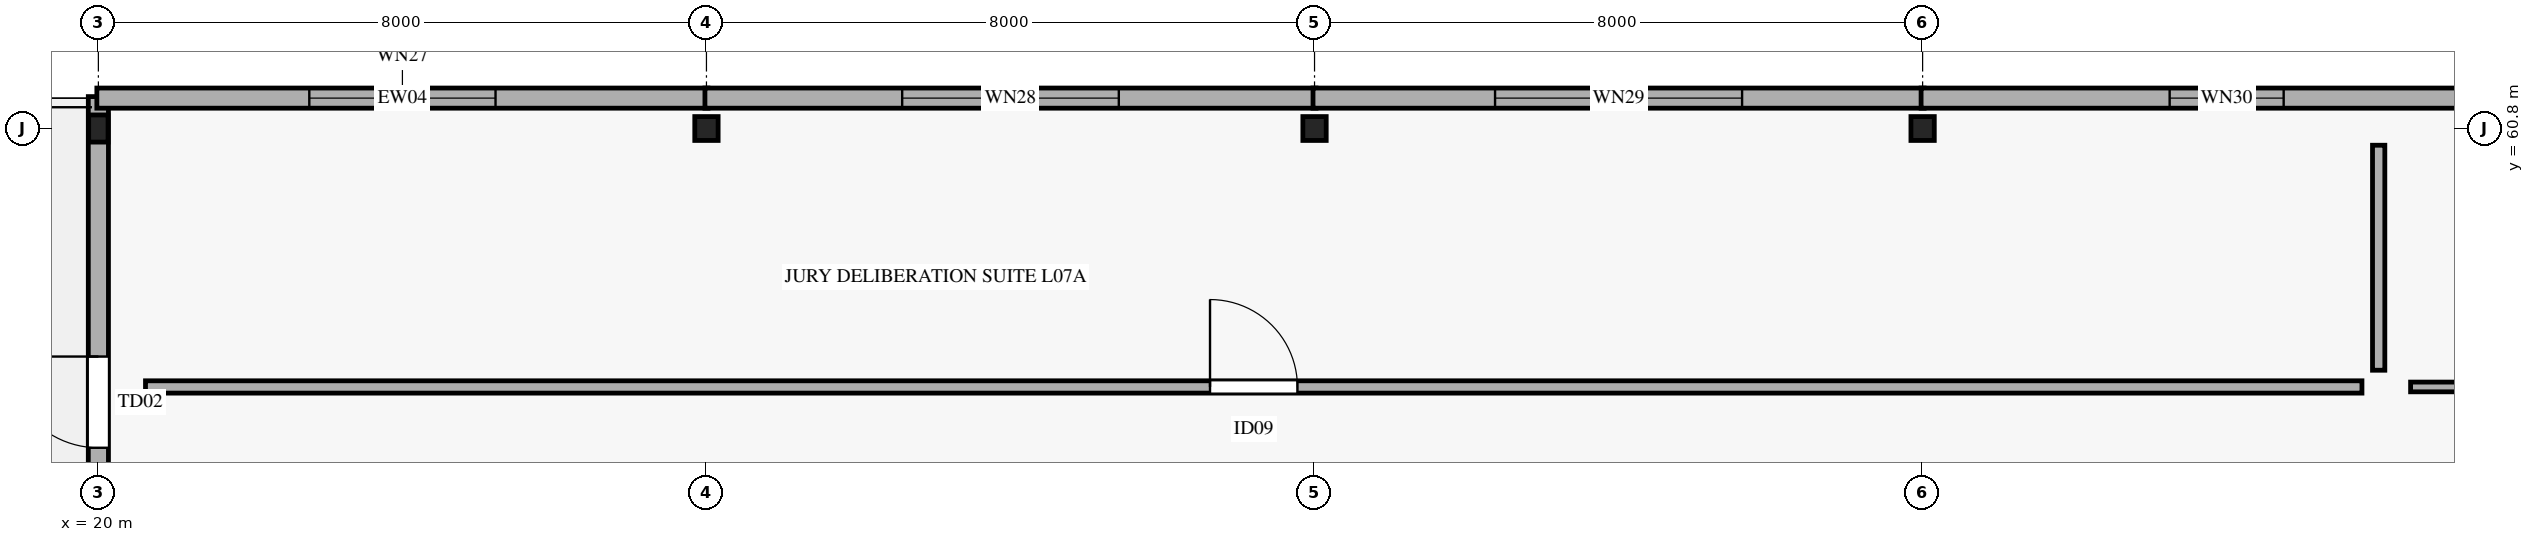
"""IFC4 building model, lengths in metres.
Left out: names, types, materials, properties, quantities, classifications, styles, units other than length and angle.
Written with IfcOpenShell. Run it as: python <this file> out.ifc"""

import sys

from ifc_helpers import new_model, si_unit, direction, frame, frame_2d, origin, origin_2d, place, context, subcontext, project, spatial, rectangle, i_section, extrude, element, fill, save


model = new_model("IFC4")
c1 = context("Model", 3, precision=1e-05, world=origin(), true_north=direction((0.0, 1.0)))
c2 = subcontext(c1, "Body", "Model", "MODEL_VIEW")
j1 = project(units=[si_unit("LENGTHUNIT", "METRE"), si_unit("PLANEANGLEUNIT", "RADIAN")], contexts=[c1])
p1 = place(None, origin())
s1 = spatial("IfcSite", under=j1, at=p1, CompositionType="ELEMENT")
p2 = place(p1, origin())
s2 = spatial("IfcBuilding", under=s1, at=p2, CompositionType="ELEMENT")
p3 = place(p2, frame((0.0, 0.0, 33.6)))
s3 = spatial("IfcBuildingStorey", under=s2, at=p3, CompositionType="ELEMENT", Elevation=33.6)
p4 = place(p3, frame((20.0, 60.8, 0.0), z_axis=(0.0, 0.0, 1.0), x_axis=(1.0, 0.0, 0.0)))
e1 = element("IfcColumn", 1, at=p4, inside=s3, PredefinedType="COLUMN", context=c2, shape_type="SweptSolid", body=[
    extrude(i_section(OverallWidth=0.255, OverallDepth=0.357, WebThickness=0.01, FlangeThickness=0.018, FilletRadius=0.015, at=origin_2d()), origin(), (0.0, 0.0, 1.0), 3.995),
])
for number, where, z_axis, x_axis in (
    (2, (28.0, 60.8, 0.0), (0.0, 0.0, 1.0), (1.0, 0.0, 0.0)),
    (3, (36.0, 60.8, 0.0), (0.0, 0.0, 1.0), (1.0, 0.0, 0.0)),
    (4, (44.0, 60.8, 0.0), (0.0, 0.0, 1.0), (1.0, 0.0, 0.0)),
):
    element("IfcColumn", number, at=place(p3, frame(where, z_axis=z_axis, x_axis=x_axis)), inside=s3, PredefinedType="COLUMN", context=c2, shape_type="SweptSolid", body=[
        extrude(i_section(OverallWidth=0.307, OverallDepth=0.314, WebThickness=0.012, FlangeThickness=0.019, FilletRadius=0.015, at=origin_2d()), origin(), (0.0, 0.0, 1.0), 3.995),
    ])
p5 = place(p3, frame((20.0, 53.18, 0.0), z_axis=(0.0, 0.0, 1.0), x_axis=(0.0, 1.0, 0.0)))
e5 = element("IfcWall", 5, at=p5, inside=s3, PredefinedType="STANDARD", context=c2, shape_type="SweptSolid", body=[
    extrude(rectangle(XDim=8.04, YDim=0.265, at=frame_2d((4.02, 0.0))), origin(), (0.0, 0.0, 1.0), 3.06),
])
p6 = place(p5, frame((3.42, 0.0, 0.0)))
e6 = element("IfcOpeningElement", 6, at=p6, cuts=e5, PredefinedType="OPENING", context=c2, shape_type="SweptSolid", body=[
    extrude(rectangle(XDim=1.2, YDim=2.2, at=frame_2d((0.6, 1.1))), frame((0.0, 0.142, 0.0), z_axis=(0.0, -1.0, 0.0), x_axis=(1.0, 0.0, 0.0)), (0.0, 0.0, 1.0), 0.285),
])
p7 = place(p3, frame((19.98, 61.2, 0.0), z_axis=(0.0, 0.0, 1.0), x_axis=(1.0, 0.0, 0.0)))
e7 = element("IfcWall", 7, at=p7, inside=s3, PredefinedType="STANDARD", context=c2, shape_type="SweptSolid", body=[
    extrude(rectangle(XDim=8.04, YDim=0.265, at=frame_2d((4.02, 0.0))), origin(), (0.0, 0.0, 1.0), 3.06),
])
p8 = place(p7, frame((2.795, 0.0, 0.75)))
e8 = element("IfcOpeningElement", 8, at=p8, cuts=e7, PredefinedType="OPENING", context=c2, shape_type="SweptSolid", body=[
    extrude(rectangle(XDim=2.45, YDim=1.55, at=frame_2d((1.225, 0.775))), frame((0.0, 0.142, 0.0), z_axis=(0.0, -1.0, 0.0), x_axis=(1.0, 0.0, 0.0)), (0.0, 0.0, 1.0), 0.285),
])
p9 = place(p3, frame((27.98, 61.2, 0.0), z_axis=(0.0, 0.0, 1.0), x_axis=(1.0, 0.0, 0.0)))
e9 = element("IfcWall", 9, at=p9, inside=s3, PredefinedType="STANDARD", context=c2, shape_type="SweptSolid", body=[
    extrude(rectangle(XDim=8.04, YDim=0.265, at=frame_2d((4.02, 0.0))), origin(), (0.0, 0.0, 1.0), 3.06),
])
p10 = place(p9, frame((2.595, 0.0, 0.75)))
e10 = element("IfcOpeningElement", 10, at=p10, cuts=e9, PredefinedType="OPENING", context=c2, shape_type="SweptSolid", body=[
    extrude(rectangle(XDim=2.85, YDim=1.55, at=frame_2d((1.425, 0.775))), frame((0.0, 0.142, 0.0), z_axis=(0.0, -1.0, 0.0), x_axis=(1.0, 0.0, 0.0)), (0.0, 0.0, 1.0), 0.285),
])
p11 = place(p3, frame((35.98, 61.2, 0.0), z_axis=(0.0, 0.0, 1.0), x_axis=(1.0, 0.0, 0.0)))
e11 = element("IfcWall", 11, at=p11, inside=s3, PredefinedType="STANDARD", context=c2, shape_type="SweptSolid", body=[
    extrude(rectangle(XDim=8.04, YDim=0.265, at=frame_2d((4.02, 0.0))), origin(), (0.0, 0.0, 1.0), 3.06),
])
p12 = place(p11, frame((2.395, 0.0, 0.75)))
e12 = element("IfcOpeningElement", 12, at=p12, cuts=e11, PredefinedType="OPENING", context=c2, shape_type="SweptSolid", body=[
    extrude(rectangle(XDim=3.25, YDim=1.55, at=frame_2d((1.625, 0.775))), frame((0.0, 0.142, 0.0), z_axis=(0.0, -1.0, 0.0), x_axis=(1.0, 0.0, 0.0)), (0.0, 0.0, 1.0), 0.285),
])
p13 = place(p3, frame((43.98, 61.2, 0.0), z_axis=(0.0, 0.0, 1.0), x_axis=(1.0, 0.0, 0.0)))
e13 = element("IfcWall", 13, at=p13, inside=s3, PredefinedType="STANDARD", context=c2, shape_type="SweptSolid", body=[
    extrude(rectangle(XDim=8.04, YDim=0.265, at=frame_2d((4.02, 0.0))), origin(), (0.0, 0.0, 1.0), 3.06),
])
p14 = place(p13, frame((3.27, 0.0, 0.75)))
e14 = element("IfcOpeningElement", 14, at=p14, cuts=e13, PredefinedType="OPENING", context=c2, shape_type="SweptSolid", body=[
    extrude(rectangle(XDim=1.5, YDim=1.3, at=frame_2d((0.75, 0.65))), frame((0.0, 0.142, 0.0), z_axis=(0.0, -1.0, 0.0), x_axis=(1.0, 0.0, 0.0)), (0.0, 0.0, 1.0), 0.285),
])
p15 = place(p3, frame((20.62, 57.4, 0.0), z_axis=(0.0, 0.0, 1.0), x_axis=(1.0, 0.0, 0.0)))
e15 = element("IfcWall", 15, at=p15, inside=s3, PredefinedType="PARTITIONING", context=c2, shape_type="SweptSolid", body=[
    extrude(rectangle(XDim=29.16, YDim=0.162, at=frame_2d((14.58, 0.0))), origin(), (0.0, 0.0, 1.0), 2.85),
])
p16 = place(p15, frame((14.005, 0.0, 0.0)))
e16 = element("IfcOpeningElement", 16, at=p16, cuts=e15, PredefinedType="OPENING", context=c2, shape_type="SweptSolid", body=[
    extrude(rectangle(XDim=1.15, YDim=2.15, at=frame_2d((0.575, 1.075))), frame((0.0, 0.091, 0.0), z_axis=(0.0, -1.0, 0.0), x_axis=(1.0, 0.0, 0.0)), (0.0, 0.0, 1.0), 0.182),
])
p17 = place(p3, frame((50.0, 57.62, 0.0), z_axis=(0.0, 0.0, 1.0), x_axis=(0.0, 1.0, 0.0)))
e17 = element("IfcWall", 17, at=p17, inside=s3, PredefinedType="PARTITIONING", context=c2, shape_type="SweptSolid", body=[
    extrude(rectangle(XDim=2.96, YDim=0.162, at=frame_2d((1.48, 0.0))), origin(), (0.0, 0.0, 1.0), 2.85),
])
p18 = place(p3, frame((50.42, 57.4, 0.0), z_axis=(0.0, 0.0, 1.0), x_axis=(1.0, 0.0, 0.0)))
e18 = element("IfcWall", 18, at=p18, inside=s3, PredefinedType="PARTITIONING", context=c2, shape_type="SweptSolid", body=[
    extrude(rectangle(XDim=16.96, YDim=0.128, at=frame_2d((8.48, 0.0))), origin(), (0.0, 0.0, 1.0), 2.85),
])
p19 = place(p18, frame((7.955, 0.0, 0.0)))
e19 = element("IfcOpeningElement", 19, at=p19, cuts=e18, PredefinedType="OPENING", context=c2, shape_type="SweptSolid", body=[
    extrude(rectangle(XDim=1.05, YDim=2.15, at=frame_2d((0.525, 1.075))), frame((0.0, 0.074, 0.0), z_axis=(0.0, -1.0, 0.0), x_axis=(1.0, 0.0, 0.0)), (0.0, 0.0, 1.0), 0.148),
])
p20 = place(p6, origin())
e20 = element("IfcDoor", 20, at=p20, inside=s3, OperationType="SINGLE_SWING_RIGHT", PredefinedType="DOOR", context=c2, shape_type="SweptSolid", body=[
    extrude(rectangle(XDim=1.2, YDim=2.2, at=frame_2d((0.6, 1.1))), frame((0.0, 0.025, 0.0), z_axis=(0.0, -1.0, 0.0), x_axis=(1.0, 0.0, 0.0)), (0.0, 0.0, 1.0), 0.05),
])
fill(e6, e20)
p21 = place(p8, origin())
e21 = element("IfcWindow", 21, at=p21, inside=s3, PartitioningType="SINGLE_PANEL", PredefinedType="WINDOW", context=c2, shape_type="SweptSolid", body=[
    extrude(rectangle(XDim=2.45, YDim=1.55, at=frame_2d((1.225, 0.775))), frame((0.0, 0.03, 0.0), z_axis=(0.0, -1.0, 0.0), x_axis=(1.0, 0.0, 0.0)), (0.0, 0.0, 1.0), 0.06),
])
fill(e8, e21)
p22 = place(p10, origin())
e22 = element("IfcWindow", 22, at=p22, inside=s3, PartitioningType="SINGLE_PANEL", PredefinedType="WINDOW", context=c2, shape_type="SweptSolid", body=[
    extrude(rectangle(XDim=2.85, YDim=1.55, at=frame_2d((1.425, 0.775))), frame((0.0, 0.03, 0.0), z_axis=(0.0, -1.0, 0.0), x_axis=(1.0, 0.0, 0.0)), (0.0, 0.0, 1.0), 0.06),
])
fill(e10, e22)
p23 = place(p12, origin())
e23 = element("IfcWindow", 23, at=p23, inside=s3, PartitioningType="SINGLE_PANEL", PredefinedType="WINDOW", context=c2, shape_type="SweptSolid", body=[
    extrude(rectangle(XDim=3.25, YDim=1.55, at=frame_2d((1.625, 0.775))), frame((0.0, 0.03, 0.0), z_axis=(0.0, -1.0, 0.0), x_axis=(1.0, 0.0, 0.0)), (0.0, 0.0, 1.0), 0.06),
])
fill(e12, e23)
p24 = place(p14, origin())
e24 = element("IfcWindow", 24, at=p24, inside=s3, PartitioningType="SINGLE_PANEL", PredefinedType="WINDOW", context=c2, shape_type="SweptSolid", body=[
    extrude(rectangle(XDim=1.5, YDim=1.3, at=frame_2d((0.75, 0.65))), frame((0.0, 0.03, 0.0), z_axis=(0.0, -1.0, 0.0), x_axis=(1.0, 0.0, 0.0)), (0.0, 0.0, 1.0), 0.06),
])
fill(e14, e24)
p25 = place(p16, origin())
e25 = element("IfcDoor", 25, at=p25, inside=s3, OperationType="SINGLE_SWING_LEFT", PredefinedType="DOOR", context=c2, shape_type="SweptSolid", body=[
    extrude(rectangle(XDim=1.15, YDim=2.15, at=frame_2d((0.575, 1.075))), frame((0.0, 0.025, 0.0), z_axis=(0.0, -1.0, 0.0), x_axis=(1.0, 0.0, 0.0)), (0.0, 0.0, 1.0), 0.05),
])
fill(e16, e25)
save(model, sys.argv[1])
